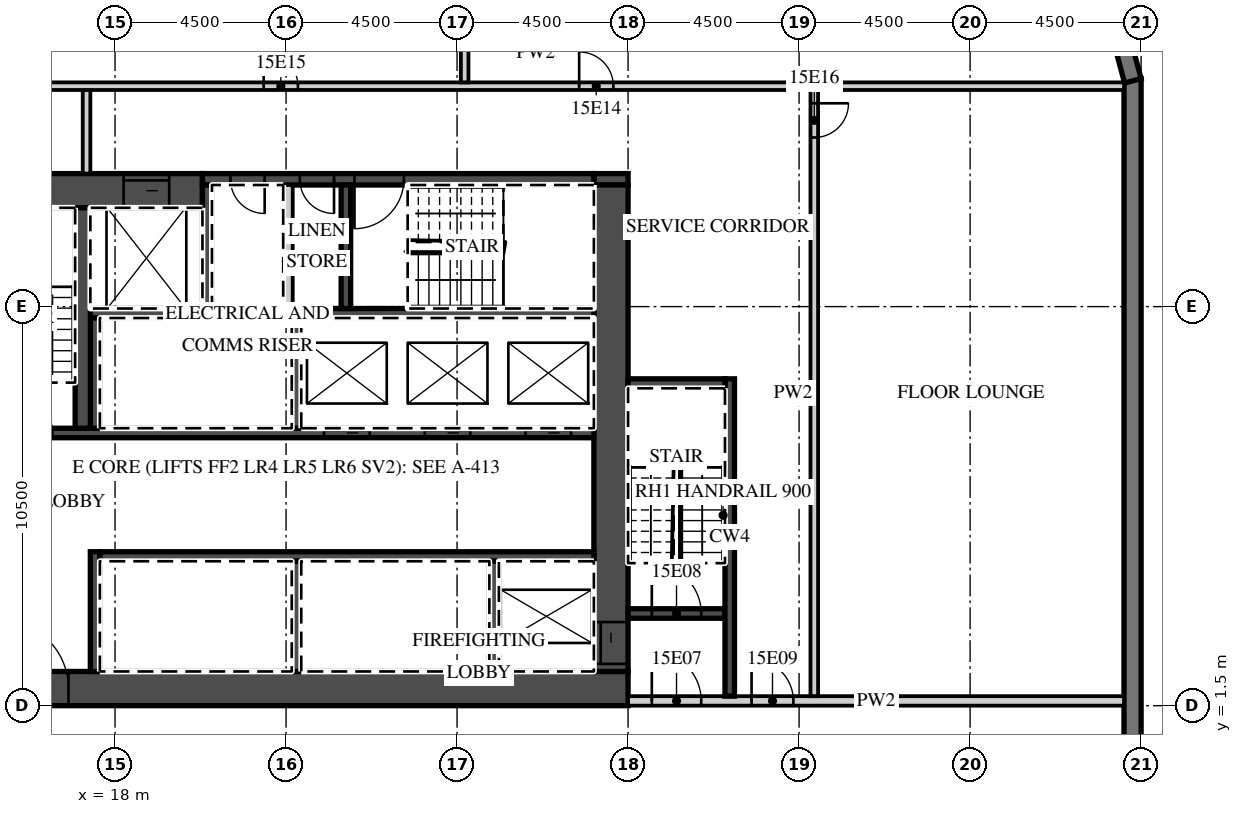
"""IFC4 building model, lengths in metres.
Left out: names, types, materials, properties, quantities, classifications, styles, units other than length and angle.
Written with IfcOpenShell. Run it as: python <this file> out.ifc"""

import sys

from ifc_helpers import new_model, si_unit, direction, frame, frame_2d, origin, place, context, subcontext, project, spatial, polyline, rectangle, outline, extrude, element, fill, save


model = new_model("IFC4")
c1 = context("Model", 3, precision=1e-05, world=origin(), true_north=direction((0.0, 1.0)))
c2 = subcontext(c1, "Body", "Model", "MODEL_VIEW")
j1 = project(units=[si_unit("LENGTHUNIT", "METRE"), si_unit("PLANEANGLEUNIT", "RADIAN")], contexts=[c1])
p1 = place(None, origin())
s1 = spatial("IfcSite", under=j1, at=p1, CompositionType="ELEMENT")
p2 = place(p1, origin())
s2 = spatial("IfcBuilding", under=s1, at=p2, CompositionType="ELEMENT")
p3 = place(p2, frame((0.0, 0.0, 79.8)))
s3 = spatial("IfcBuildingStorey", under=s2, at=p3, CompositionType="ELEMENT", Elevation=79.8)
p4 = place(p3, frame((44.775, -18.0, 0.0), z_axis=(0.0, 0.0, 1.0), x_axis=(0.0, 1.0, 0.0)))
e1 = element("IfcWall", 1, at=p4, inside=s3, PredefinedType="SOLIDWALL", context=c2, shape_type="SweptSolid", body=[
    extrude(rectangle(XDim=36.0, YDim=0.45, at=frame_2d((18.0, 0.0))), origin(), (0.0, 0.0, 1.0), 3.02),
])
p5 = place(p4, frame((3.9, 0.0, 0.45)))
e2 = element("IfcOpeningElement", 2, at=p5, cuts=e1, PredefinedType="OPENING", context=c2, shape_type="SweptSolid", body=[
    extrude(rectangle(XDim=3.3, YDim=2.25, at=frame_2d((1.65, 1.125))), frame((0.0, 0.235, 0.0), z_axis=(0.0, -1.0, 0.0), x_axis=(1.0, 0.0, 0.0)), (0.0, 0.0, 1.0), 0.47),
])
p6 = place(p4, frame((8.4, 0.0, 0.45)))
e3 = element("IfcOpeningElement", 3, at=p6, cuts=e1, PredefinedType="OPENING", context=c2, shape_type="SweptSolid", body=[
    extrude(rectangle(XDim=3.3, YDim=2.25, at=frame_2d((1.65, 1.125))), frame((0.0, 0.235, 0.0), z_axis=(0.0, -1.0, 0.0), x_axis=(1.0, 0.0, 0.0)), (0.0, 0.0, 1.0), 0.47),
])
p7 = place(p4, frame((12.9, 0.0, 0.45)))
e4 = element("IfcOpeningElement", 4, at=p7, cuts=e1, PredefinedType="OPENING", context=c2, shape_type="SweptSolid", body=[
    extrude(rectangle(XDim=3.3, YDim=2.25, at=frame_2d((1.65, 1.125))), frame((0.0, 0.235, 0.0), z_axis=(0.0, -1.0, 0.0), x_axis=(1.0, 0.0, 0.0)), (0.0, 0.0, 1.0), 0.47),
])
p8 = place(p3, frame((44.783, 17.942, 0.0), z_axis=(0.0, 0.0, 1.0), x_axis=(-0.25881466832, 0.965926999034, 0.0)))
e5 = element("IfcWall", 5, at=p8, inside=s3, PredefinedType="SOLIDWALL", context=c2, shape_type="SweptSolid", body=[
    extrude(outline(polyline([(0.0, -0.225), (2.071, -0.225), (1.95, 0.225), (0.121, 0.225), (0.0, -0.225)])), origin(), (0.0, 0.0, 1.0), 3.02),
])
p9 = place(p3, frame((13.5, 1.95, 0.0), z_axis=(0.0, 0.0, 1.0), x_axis=(1.0, 0.0, 0.0)))
e6 = element("IfcWall", 6, at=p9, inside=s3, PredefinedType="SHEAR", context=c2, shape_type="SweptSolid", body=[
    extrude(rectangle(XDim=18.0, YDim=0.9, at=frame_2d((9.0, 0.0))), origin(), (0.0, 0.0, 1.0), 3.02),
])
p10 = place(p9, frame((1.475, 0.0, 0.0)))
e7 = element("IfcOpeningElement", 7, at=p10, cuts=e6, PredefinedType="OPENING", context=c2, shape_type="SweptSolid", body=[
    extrude(rectangle(XDim=1.8, YDim=2.1, at=frame_2d((0.9, 1.05))), frame((0.0, 0.46, 0.0), z_axis=(0.0, -1.0, 0.0), x_axis=(1.0, 0.0, 0.0)), (0.0, 0.0, 1.0), 0.92),
])
p11 = place(p3, frame((13.5, 15.05, 0.0), z_axis=(0.0, 0.0, 1.0), x_axis=(1.0, 0.0, 0.0)))
e8 = element("IfcWall", 8, at=p11, inside=s3, PredefinedType="SHEAR", context=c2, shape_type="SweptSolid", body=[
    extrude(rectangle(XDim=6.8, YDim=0.9, at=frame_2d((3.4, 0.0))), origin(), (0.0, 0.0, 1.0), 3.02),
])
p12 = place(p11, frame((4.725, 0.0, 0.0)))
e9 = element("IfcOpeningElement", 9, at=p12, cuts=e8, PredefinedType="OPENING", context=c2, shape_type="SweptSolid", body=[
    extrude(rectangle(XDim=1.2, YDim=2.1, at=frame_2d((0.6, 1.05))), frame((0.0, 0.46, 0.0), z_axis=(0.0, -1.0, 0.0), x_axis=(1.0, 0.0, 0.0)), (0.0, 0.0, 1.0), 0.92),
])
p13 = place(p3, frame((30.6, 15.35, 0.0), z_axis=(0.0, 0.0, 1.0), x_axis=(1.0, 0.0, 0.0)))
e10 = element("IfcWall", 10, at=p13, inside=s3, PredefinedType="SHEAR", context=c2, shape_type="SweptSolid", body=[
    extrude(rectangle(XDim=0.9, YDim=0.3, at=frame_2d((0.45, 0.0))), origin(), (0.0, 0.0, 1.0), 3.02),
])
p14 = place(p3, frame((20.3, 15.35, 0.0), z_axis=(0.0, 0.0, 1.0), x_axis=(1.0, 0.0, 0.0)))
e11 = element("IfcWall", 11, at=p14, inside=s3, PredefinedType="SHEAR", context=c2, shape_type="SweptSolid", body=[
    extrude(rectangle(XDim=10.3, YDim=0.3, at=frame_2d((5.15, 0.0))), origin(), (0.0, 0.0, 1.0), 3.02),
])
p15 = place(p14, frame((4.0, 0.0, 0.0)))
e12 = element("IfcOpeningElement", 12, at=p15, cuts=e11, PredefinedType="OPENING", context=c2, shape_type="SweptSolid", body=[
    extrude(rectangle(XDim=1.3, YDim=2.1, at=frame_2d((0.65, 1.05))), frame((0.0, 0.16, 0.0), z_axis=(0.0, -1.0, 0.0), x_axis=(1.0, 0.0, 0.0)), (0.0, 0.0, 1.0), 0.32),
])
p16 = place(p14, frame((2.562, 0.0, 0.0)))
e13 = element("IfcOpeningElement", 13, at=p16, cuts=e11, PredefinedType="OPENING", context=c2, shape_type="SweptSolid", body=[
    extrude(rectangle(XDim=0.9, YDim=2.1, at=frame_2d((0.45, 1.05))), frame((0.0, 0.16, 0.0), z_axis=(0.0, -1.0, 0.0), x_axis=(1.0, 0.0, 0.0)), (0.0, 0.0, 1.0), 0.32),
])
p17 = place(p14, frame((0.738, 0.0, 0.0)))
e14 = element("IfcOpeningElement", 14, at=p17, cuts=e11, PredefinedType="OPENING", context=c2, shape_type="SweptSolid", body=[
    extrude(rectangle(XDim=0.9, YDim=2.1, at=frame_2d((0.45, 1.05))), frame((0.0, 0.16, 0.0), z_axis=(0.0, -1.0, 0.0), x_axis=(1.0, 0.0, 0.0)), (0.0, 0.0, 1.0), 0.32),
])
p18 = place(p3, frame((31.05, 2.4, 0.0), z_axis=(0.0, 0.0, 1.0), x_axis=(0.0, 1.0, 0.0)))
e15 = element("IfcWall", 15, at=p18, inside=s3, PredefinedType="SHEAR", context=c2, shape_type="SweptSolid", body=[
    extrude(rectangle(XDim=12.8, YDim=0.9, at=frame_2d((6.4, 0.0))), origin(), (0.0, 0.0, 1.0), 3.02),
])
p19 = place(p18, frame((0.2, 0.0, 0.0)))
e16 = element("IfcOpeningElement", 16, at=p19, cuts=e15, PredefinedType="OPENING", context=c2, shape_type="SweptSolid", body=[
    extrude(rectangle(XDim=1.1, YDim=2.1, at=frame_2d((0.55, 1.05))), frame((0.0, 0.46, 0.0), z_axis=(0.0, -1.0, 0.0), x_axis=(1.0, 0.0, 0.0)), (0.0, 0.0, 1.0), 0.92),
])
p20 = place(p3, frame((17.6, 5.425, 0.0), z_axis=(0.0, 0.0, 1.0), x_axis=(1.0, 0.0, 0.0)))
e17 = element("IfcWall", 17, at=p20, inside=s3, PredefinedType="SHEAR", context=c2, shape_type="SweptSolid", body=[
    extrude(rectangle(XDim=13.0, YDim=0.25, at=frame_2d((6.5, 0.0))), origin(), (0.0, 0.0, 1.0), 3.02),
])
p21 = place(p3, frame((17.475, 2.4, 0.0), z_axis=(0.0, 0.0, 1.0), x_axis=(0.0, 1.0, 0.0)))
e18 = element("IfcWall", 18, at=p21, inside=s3, PredefinedType="SHEAR", context=c2, shape_type="SweptSolid", body=[
    extrude(rectangle(XDim=3.15, YDim=0.25, at=frame_2d((1.575, 0.0))), origin(), (0.0, 0.0, 1.0), 3.02),
])
for number, where, z_axis, x_axis in (
    (19, (27.975, 2.4, 0.0), (0.0, 0.0, 1.0), (0.0, 1.0, 0.0)),
    (20, (22.775, 2.4, 0.0), (0.0, 0.0, 1.0), (0.0, 1.0, 0.0)),
):
    element("IfcWall", number, at=place(p3, frame(where, z_axis=z_axis, x_axis=x_axis)), inside=s3, PredefinedType="SHEAR", context=c2, shape_type="SweptSolid", body=[
        extrude(rectangle(XDim=2.9, YDim=0.25, at=frame_2d((1.45, 0.0))), origin(), (0.0, 0.0, 1.0), 3.02),
    ])
p22 = place(p3, frame((14.4, 8.675, 0.0), z_axis=(0.0, 0.0, 1.0), x_axis=(1.0, 0.0, 0.0)))
e21 = element("IfcWall", 21, at=p22, inside=s3, PredefinedType="SHEAR", context=c2, shape_type="SweptSolid", body=[
    extrude(rectangle(XDim=16.2, YDim=0.25, at=frame_2d((8.1, 0.0))), origin(), (0.0, 0.0, 1.0), 3.02),
])
p23 = place(p22, frame((14.4, 0.0, 0.0)))
e22 = element("IfcOpeningElement", 22, at=p23, cuts=e21, PredefinedType="OPENING", context=c2, shape_type="SweptSolid", body=[
    extrude(rectangle(XDim=1.2, YDim=2.1, at=frame_2d((0.6, 1.05))), frame((0.0, 0.135, 0.0), z_axis=(0.0, -1.0, 0.0), x_axis=(1.0, 0.0, 0.0)), (0.0, 0.0, 1.0), 0.27),
])
p24 = place(p22, frame((11.75, 0.0, 0.0)))
e23 = element("IfcOpeningElement", 23, at=p24, cuts=e21, PredefinedType="OPENING", context=c2, shape_type="SweptSolid", body=[
    extrude(rectangle(XDim=1.2, YDim=2.1, at=frame_2d((0.6, 1.05))), frame((0.0, 0.135, 0.0), z_axis=(0.0, -1.0, 0.0), x_axis=(1.0, 0.0, 0.0)), (0.0, 0.0, 1.0), 0.27),
])
p25 = place(p22, frame((9.1, 0.0, 0.0)))
e24 = element("IfcOpeningElement", 24, at=p25, cuts=e21, PredefinedType="OPENING", context=c2, shape_type="SweptSolid", body=[
    extrude(rectangle(XDim=1.2, YDim=2.1, at=frame_2d((0.6, 1.05))), frame((0.0, 0.135, 0.0), z_axis=(0.0, -1.0, 0.0), x_axis=(1.0, 0.0, 0.0)), (0.0, 0.0, 1.0), 0.27),
])
p26 = place(p22, frame((0.65, 0.0, 0.0)))
e25 = element("IfcOpeningElement", 25, at=p26, cuts=e21, PredefinedType="OPENING", context=c2, shape_type="SweptSolid", body=[
    extrude(rectangle(XDim=1.3, YDim=2.1, at=frame_2d((0.65, 1.05))), frame((0.0, 0.135, 0.0), z_axis=(0.0, -1.0, 0.0), x_axis=(1.0, 0.0, 0.0)), (0.0, 0.0, 1.0), 0.27),
])
p27 = place(p3, frame((17.35, 11.825, 0.0), z_axis=(0.0, 0.0, 1.0), x_axis=(1.0, 0.0, 0.0)))
e26 = element("IfcWall", 26, at=p27, inside=s3, PredefinedType="SHEAR", context=c2, shape_type="SweptSolid", body=[
    extrude(rectangle(XDim=13.25, YDim=0.25, at=frame_2d((6.625, 0.0))), origin(), (0.0, 0.0, 1.0), 3.02),
])
for number, where, z_axis, x_axis in (
    (27, (17.475, 8.8, 0.0), (0.0, 0.0, 1.0), (0.0, 1.0, 0.0)),
    (28, (22.775, 8.8, 0.0), (0.0, 0.0, 1.0), (0.0, 1.0, 0.0)),
):
    element("IfcWall", number, at=place(p3, frame(where, z_axis=z_axis, x_axis=x_axis)), inside=s3, PredefinedType="SHEAR", context=c2, shape_type="SweptSolid", body=[
        extrude(rectangle(XDim=2.9, YDim=0.25, at=frame_2d((1.45, 0.0))), origin(), (0.0, 0.0, 1.0), 3.02),
    ])
p28 = place(p3, frame((17.15, 8.8, 0.0), z_axis=(0.0, 0.0, 1.0), x_axis=(0.0, 1.0, 0.0)))
e29 = element("IfcWall", 29, at=p28, inside=s3, PredefinedType="SHEAR", context=c2, shape_type="SweptSolid", body=[
    extrude(rectangle(XDim=5.8, YDim=0.4, at=frame_2d((2.9, 0.0))), origin(), (0.0, 0.0, 1.0), 3.02),
])
for number, where, z_axis, x_axis in (
    (30, (20.425, 11.95, 0.0), (0.0, 0.0, 1.0), (0.0, 1.0, 0.0)),
    (31, (24.075, 11.95, 0.0), (0.0, 0.0, 1.0), (0.0, 1.0, 0.0)),
):
    element("IfcWall", number, at=place(p3, frame(where, z_axis=z_axis, x_axis=x_axis)), inside=s3, PredefinedType="SHEAR", context=c2, shape_type="SweptSolid", body=[
        extrude(rectangle(XDim=3.25, YDim=0.25, at=frame_2d((1.625, 0.0))), origin(), (0.0, 0.0, 1.0), 3.02),
    ])
p29 = place(p3, frame((22.55, 11.95, 0.0), z_axis=(0.0, 0.0, 1.0), x_axis=(0.0, 1.0, 0.0)))
e32 = element("IfcWall", 32, at=p29, inside=s3, PredefinedType="PARTITIONING", context=c2, shape_type="SweptSolid", body=[
    extrude(rectangle(XDim=3.25, YDim=0.25, at=frame_2d((1.625, 0.0))), origin(), (0.0, 0.0, 1.0), 3.02),
])
p30 = place(p3, frame((31.5, 1.625, 0.0), z_axis=(0.0, 0.0, 1.0), x_axis=(1.0, 0.0, 0.0)))
e33 = element("IfcWall", 33, at=p30, inside=s3, PredefinedType="PARTITIONING", context=c2, shape_type="SweptSolid", body=[
    extrude(rectangle(XDim=13.05, YDim=0.25, at=frame_2d((6.525, 0.0))), origin(), (0.0, 0.0, 1.0), 3.02),
])
p31 = place(p30, frame((0.625, 0.0, 0.0)))
e34 = element("IfcOpeningElement", 34, at=p31, cuts=e33, PredefinedType="OPENING", context=c2, shape_type="SweptSolid", body=[
    extrude(rectangle(XDim=1.3, YDim=2.1, at=frame_2d((0.65, 1.05))), frame((0.0, 0.135, 0.0), z_axis=(0.0, -1.0, 0.0), x_axis=(1.0, 0.0, 0.0)), (0.0, 0.0, 1.0), 0.27),
])
p32 = place(p30, frame((3.25, 0.0, 0.0)))
e35 = element("IfcOpeningElement", 35, at=p32, cuts=e33, PredefinedType="OPENING", context=c2, shape_type="SweptSolid", body=[
    extrude(rectangle(XDim=1.1, YDim=2.1, at=frame_2d((0.55, 1.05))), frame((0.0, 0.135, 0.0), z_axis=(0.0, -1.0, 0.0), x_axis=(1.0, 0.0, 0.0)), (0.0, 0.0, 1.0), 0.27),
])
p33 = place(p3, frame((31.5, 3.925, 0.0), z_axis=(0.0, 0.0, 1.0), x_axis=(1.0, 0.0, 0.0)))
e36 = element("IfcWall", 36, at=p33, inside=s3, PredefinedType="SHEAR", context=c2, shape_type="SweptSolid", body=[
    extrude(rectangle(XDim=2.55, YDim=0.25, at=frame_2d((1.275, 0.0))), origin(), (0.0, 0.0, 1.0), 3.02),
])
p34 = place(p33, frame((0.625, 0.0, 0.0)))
e37 = element("IfcOpeningElement", 37, at=p34, cuts=e36, PredefinedType="OPENING", context=c2, shape_type="SweptSolid", body=[
    extrude(rectangle(XDim=1.3, YDim=2.1, at=frame_2d((0.65, 1.05))), frame((0.0, 0.135, 0.0), z_axis=(0.0, -1.0, 0.0), x_axis=(1.0, 0.0, 0.0)), (0.0, 0.0, 1.0), 0.27),
])
p35 = place(p3, frame((34.175, 1.75, 0.0), z_axis=(0.0, 0.0, 1.0), x_axis=(0.0, 1.0, 0.0)))
e38 = element("IfcWall", 38, at=p35, inside=s3, PredefinedType="SHEAR", context=c2, shape_type="SweptSolid", body=[
    extrude(rectangle(XDim=8.35, YDim=0.25, at=frame_2d((4.175, 0.0))), origin(), (0.0, 0.0, 1.0), 3.02),
])
p36 = place(p3, frame((31.5, 9.975, 0.0), z_axis=(0.0, 0.0, 1.0), x_axis=(1.0, 0.0, 0.0)))
e39 = element("IfcWall", 39, at=p36, inside=s3, PredefinedType="SHEAR", context=c2, shape_type="SweptSolid", body=[
    extrude(rectangle(XDim=2.55, YDim=0.25, at=frame_2d((1.275, 0.0))), origin(), (0.0, 0.0, 1.0), 3.02),
])
p37 = place(p3, frame((17.25, 15.5, 0.0), z_axis=(0.0, 0.0, 1.0), x_axis=(0.0, 1.0, 0.0)))
e40 = element("IfcWall", 40, at=p37, inside=s3, PredefinedType="PARTITIONING", context=c2, shape_type="SweptSolid", body=[
    extrude(rectangle(XDim=2.2, YDim=0.2, at=frame_2d((1.1, 0.0))), origin(), (0.0, 0.0, 1.0), 3.02),
])
p38 = place(p3, frame((36.4, 1.75, 0.0), z_axis=(0.0, 0.0, 1.0), x_axis=(0.0, 1.0, 0.0)))
e41 = element("IfcWall", 41, at=p38, inside=s3, PredefinedType="PARTITIONING", context=c2, shape_type="SweptSolid", body=[
    extrude(rectangle(XDim=15.95, YDim=0.2, at=frame_2d((7.975, 0.0))), origin(), (0.0, 0.0, 1.0), 3.02),
])
p39 = place(p38, frame((14.7, 0.0, 0.0)))
e42 = element("IfcOpeningElement", 42, at=p39, cuts=e41, PredefinedType="OPENING", context=c2, shape_type="SweptSolid", body=[
    extrude(rectangle(XDim=0.9, YDim=2.1, at=frame_2d((0.45, 1.05))), frame((0.0, 0.11, 0.0), z_axis=(0.0, -1.0, 0.0), x_axis=(1.0, 0.0, 0.0)), (0.0, 0.0, 1.0), 0.22),
])
p40 = place(p3, frame((13.6, 17.8, 0.0), z_axis=(0.0, 0.0, 1.0), x_axis=(1.0, 0.0, 0.0)))
e43 = element("IfcWall", 43, at=p40, inside=s3, PredefinedType="PARTITIONING", context=c2, shape_type="SweptSolid", body=[
    extrude(rectangle(XDim=30.95, YDim=0.2, at=frame_2d((15.475, 0.0))), origin(), (0.0, 0.0, 1.0), 3.02),
])
p41 = place(p40, frame((16.613, 0.0, 0.0)))
e44 = element("IfcOpeningElement", 44, at=p41, cuts=e43, PredefinedType="OPENING", context=c2, shape_type="SweptSolid", body=[
    extrude(rectangle(XDim=0.9, YDim=2.1, at=frame_2d((0.45, 1.05))), frame((0.0, 0.11, 0.0), z_axis=(0.0, -1.0, 0.0), x_axis=(1.0, 0.0, 0.0)), (0.0, 0.0, 1.0), 0.22),
])
p42 = place(p40, frame((8.312, 0.0, 0.0)))
e45 = element("IfcOpeningElement", 45, at=p42, cuts=e43, PredefinedType="OPENING", context=c2, shape_type="SweptSolid", body=[
    extrude(rectangle(XDim=0.9, YDim=2.1, at=frame_2d((0.45, 1.05))), frame((0.0, 0.11, 0.0), z_axis=(0.0, -1.0, 0.0), x_axis=(1.0, 0.0, 0.0)), (0.0, 0.0, 1.0), 0.22),
])
p43 = place(p3, frame((27.2, 17.9, 0.0), z_axis=(0.0, 0.0, 1.0), x_axis=(0.0, 1.0, 0.0)))
e46 = element("IfcWall", 46, at=p43, inside=s3, PredefinedType="PARTITIONING", context=c2, shape_type="SweptSolid", body=[
    extrude(rectangle(XDim=3.65, YDim=0.2, at=frame_2d((1.825, 0.0))), origin(), (0.0, 0.0, 1.0), 3.02),
])
p44 = place(p23, origin())
e47 = element("IfcDoor", 47, at=p44, inside=s3, OperationType="SLIDING_TO_LEFT", PredefinedType="DOOR", context=c2, shape_type="SweptSolid", body=[
    extrude(rectangle(XDim=1.2, YDim=2.1, at=frame_2d((0.6, 1.05))), frame((0.0, 0.025, 0.0), z_axis=(0.0, -1.0, 0.0), x_axis=(1.0, 0.0, 0.0)), (0.0, 0.0, 1.0), 0.05),
])
fill(e22, e47)
p45 = place(p24, origin())
e48 = element("IfcDoor", 48, at=p45, inside=s3, OperationType="SLIDING_TO_RIGHT", PredefinedType="DOOR", context=c2, shape_type="SweptSolid", body=[
    extrude(rectangle(XDim=1.2, YDim=2.1, at=frame_2d((0.6, 1.05))), frame((0.0, 0.025, 0.0), z_axis=(0.0, -1.0, 0.0), x_axis=(1.0, 0.0, 0.0)), (0.0, 0.0, 1.0), 0.05),
])
fill(e23, e48)
p46 = place(p25, origin())
e49 = element("IfcDoor", 49, at=p46, inside=s3, OperationType="SLIDING_TO_RIGHT", PredefinedType="DOOR", context=c2, shape_type="SweptSolid", body=[
    extrude(rectangle(XDim=1.2, YDim=2.1, at=frame_2d((0.6, 1.05))), frame((0.0, 0.025, 0.0), z_axis=(0.0, -1.0, 0.0), x_axis=(1.0, 0.0, 0.0)), (0.0, 0.0, 1.0), 0.05),
])
fill(e24, e49)
p47 = place(p12, origin())
e50 = element("IfcDoor", 50, at=p47, inside=s3, OperationType="SLIDING_TO_LEFT", PredefinedType="DOOR", context=c2, shape_type="SweptSolid", body=[
    extrude(rectangle(XDim=1.2, YDim=2.1, at=frame_2d((0.6, 1.05))), frame((0.0, 0.025, 0.0), z_axis=(0.0, -1.0, 0.0), x_axis=(1.0, 0.0, 0.0)), (0.0, 0.0, 1.0), 0.05),
])
fill(e9, e50)
p48 = place(p19, origin())
e51 = element("IfcDoor", 51, at=p48, inside=s3, OperationType="SLIDING_TO_LEFT", PredefinedType="DOOR", context=c2, shape_type="SweptSolid", body=[
    extrude(rectangle(XDim=1.1, YDim=2.1, at=frame_2d((0.55, 1.05))), frame((0.0, 0.025, 0.0), z_axis=(0.0, -1.0, 0.0), x_axis=(1.0, 0.0, 0.0)), (0.0, 0.0, 1.0), 0.05),
])
fill(e16, e51)
p49 = place(p10, origin())
e52 = element("IfcDoor", 52, at=p49, inside=s3, OperationType="DOUBLE_DOOR_DOUBLE_SWING", PredefinedType="DOOR", context=c2, shape_type="SweptSolid", body=[
    extrude(rectangle(XDim=1.8, YDim=2.1, at=frame_2d((0.9, 1.05))), frame((0.0, 0.025, 0.0), z_axis=(0.0, -1.0, 0.0), x_axis=(1.0, 0.0, 0.0)), (0.0, 0.0, 1.0), 0.05),
])
fill(e7, e52)
p50 = place(p31, origin())
e53 = element("IfcDoor", 53, at=p50, inside=s3, OperationType="SINGLE_SWING_LEFT", PredefinedType="DOOR", context=c2, shape_type="SweptSolid", body=[
    extrude(rectangle(XDim=1.3, YDim=2.1, at=frame_2d((0.65, 1.05))), frame((0.0, 0.025, 0.0), z_axis=(0.0, -1.0, 0.0), x_axis=(1.0, 0.0, 0.0)), (0.0, 0.0, 1.0), 0.05),
])
fill(e34, e53)
p51 = place(p34, origin())
e54 = element("IfcDoor", 54, at=p51, inside=s3, OperationType="SINGLE_SWING_LEFT", PredefinedType="DOOR", context=c2, shape_type="SweptSolid", body=[
    extrude(rectangle(XDim=1.3, YDim=2.1, at=frame_2d((0.65, 1.05))), frame((0.0, 0.025, 0.0), z_axis=(0.0, -1.0, 0.0), x_axis=(1.0, 0.0, 0.0)), (0.0, 0.0, 1.0), 0.05),
])
fill(e37, e54)
p52 = place(p32, origin())
e55 = element("IfcDoor", 55, at=p52, inside=s3, OperationType="SINGLE_SWING_LEFT", PredefinedType="DOOR", context=c2, shape_type="SweptSolid", body=[
    extrude(rectangle(XDim=1.1, YDim=2.1, at=frame_2d((0.55, 1.05))), frame((0.0, 0.025, 0.0), z_axis=(0.0, -1.0, 0.0), x_axis=(1.0, 0.0, 0.0)), (0.0, 0.0, 1.0), 0.05),
])
fill(e35, e55)
p53 = place(p15, origin())
e56 = element("IfcDoor", 56, at=p53, inside=s3, OperationType="SINGLE_SWING_LEFT", PredefinedType="DOOR", context=c2, shape_type="SweptSolid", body=[
    extrude(rectangle(XDim=1.3, YDim=2.1, at=frame_2d((0.65, 1.05))), frame((0.0, 0.025, 0.0), z_axis=(0.0, -1.0, 0.0), x_axis=(1.0, 0.0, 0.0)), (0.0, 0.0, 1.0), 0.05),
])
fill(e12, e56)
p54 = place(p16, origin())
e57 = element("IfcDoor", 57, at=p54, inside=s3, OperationType="SINGLE_SWING_RIGHT", PredefinedType="DOOR", context=c2, shape_type="SweptSolid", body=[
    extrude(rectangle(XDim=0.9, YDim=2.1, at=frame_2d((0.45, 1.05))), frame((0.0, 0.025, 0.0), z_axis=(0.0, -1.0, 0.0), x_axis=(1.0, 0.0, 0.0)), (0.0, 0.0, 1.0), 0.05),
])
fill(e13, e57)
p55 = place(p17, origin())
e58 = element("IfcDoor", 58, at=p55, inside=s3, OperationType="SINGLE_SWING_RIGHT", PredefinedType="DOOR", context=c2, shape_type="SweptSolid", body=[
    extrude(rectangle(XDim=0.9, YDim=2.1, at=frame_2d((0.45, 1.05))), frame((0.0, 0.025, 0.0), z_axis=(0.0, -1.0, 0.0), x_axis=(1.0, 0.0, 0.0)), (0.0, 0.0, 1.0), 0.05),
])
fill(e14, e58)
p56 = place(p41, origin())
e59 = element("IfcDoor", 59, at=p56, inside=s3, OperationType="SINGLE_SWING_LEFT", PredefinedType="DOOR", context=c2, shape_type="SweptSolid", body=[
    extrude(rectangle(XDim=0.9, YDim=2.1, at=frame_2d((0.45, 1.05))), frame((0.0, 0.025, 0.0), z_axis=(0.0, -1.0, 0.0), x_axis=(1.0, 0.0, 0.0)), (0.0, 0.0, 1.0), 0.05),
])
fill(e44, e59)
p57 = place(p42, origin())
e60 = element("IfcDoor", 60, at=p57, inside=s3, OperationType="SINGLE_SWING_LEFT", PredefinedType="DOOR", context=c2, shape_type="SweptSolid", body=[
    extrude(rectangle(XDim=0.9, YDim=2.1, at=frame_2d((0.45, 1.05))), frame((0.0, 0.025, 0.0), z_axis=(0.0, -1.0, 0.0), x_axis=(1.0, 0.0, 0.0)), (0.0, 0.0, 1.0), 0.05),
])
fill(e45, e60)
p58 = place(p39, origin())
e61 = element("IfcDoor", 61, at=p58, inside=s3, OperationType="SINGLE_SWING_RIGHT", PredefinedType="DOOR", context=c2, shape_type="SweptSolid", body=[
    extrude(rectangle(XDim=0.9, YDim=2.1, at=frame_2d((0.45, 1.05))), frame((0.0, 0.025, 0.0), z_axis=(0.0, -1.0, 0.0), x_axis=(1.0, 0.0, 0.0)), (0.0, 0.0, 1.0), 0.05),
])
fill(e42, e61)
save(model, sys.argv[1])
